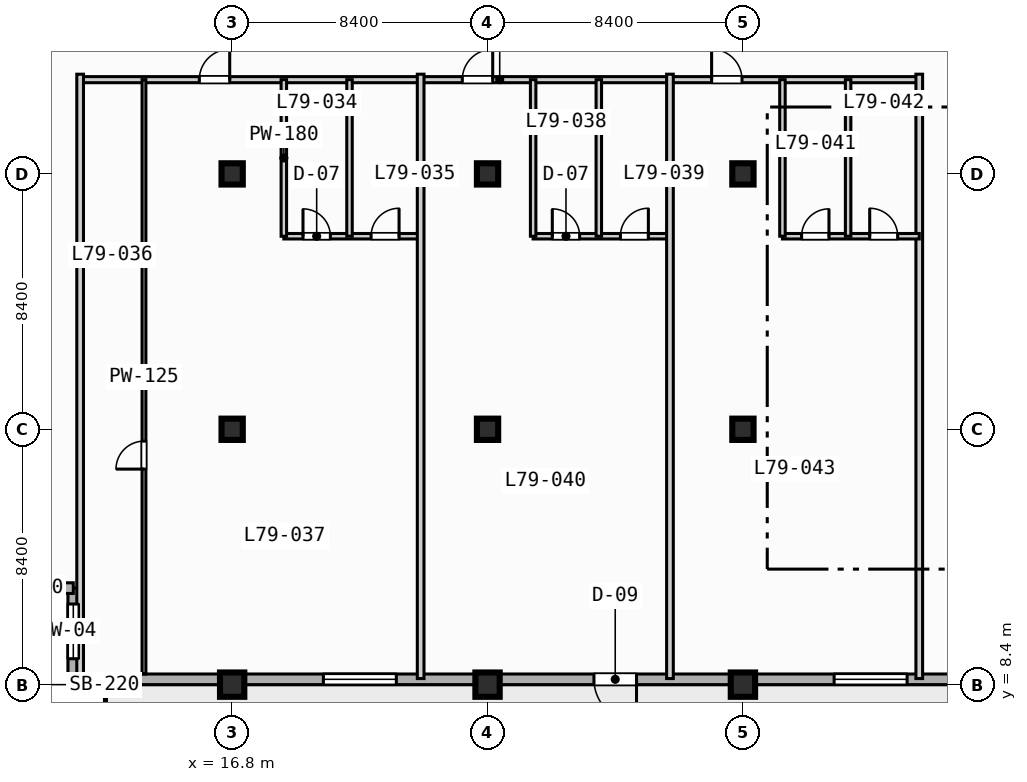
"""IFC4 building model, lengths in metres.
Left out: names, types, materials, properties, quantities, classifications, styles, units other than length and angle.
Written with IfcOpenShell. Run it as: python <this file> out.ifc"""

import sys

from ifc_helpers import new_model, si_unit, direction, frame, frame_2d, origin, origin_2d, place, context, subcontext, project, spatial, rectangle, extrude, element, fill, save


model = new_model("IFC4")
c1 = context("Model", 3, precision=1e-05, world=origin(), true_north=direction((0.0, 1.0)))
c2 = subcontext(c1, "Body", "Model", "MODEL_VIEW")
j1 = project(units=[si_unit("LENGTHUNIT", "METRE"), si_unit("PLANEANGLEUNIT", "RADIAN")], contexts=[c1])
p1 = place(None, origin())
s1 = spatial("IfcSite", under=j1, at=p1, CompositionType="ELEMENT")
p2 = place(p1, origin())
s2 = spatial("IfcBuilding", under=s1, at=p2, CompositionType="ELEMENT")
p3 = place(p2, frame((0.0, 0.0, 320.3)))
s3 = spatial("IfcBuildingStorey", under=s2, at=p3, CompositionType="ELEMENT", Elevation=320.3)
p4 = place(p3, frame((16.8, 8.4, 0.0), z_axis=(0.0, 0.0, 1.0), x_axis=(1.0, 0.0, 0.0)))
e1 = element("IfcColumn", 1, at=p4, inside=s3, PredefinedType="COLUMN", context=c2, shape_type="SweptSolid", body=[
    extrude(rectangle(XDim=0.8, YDim=0.8, at=origin_2d()), origin(), (0.0, 0.0, 1.0), 3.9),
])
for number, where, z_axis, x_axis in (
    (2, (16.8, 16.8, 0.0), (0.0, 0.0, 1.0), (1.0, 0.0, 0.0)),
    (3, (16.8, 25.2, 0.0), (0.0, 0.0, 1.0), (1.0, 0.0, 0.0)),
):
    element("IfcColumn", number, at=place(p3, frame(where, z_axis=z_axis, x_axis=x_axis)), inside=s3, PredefinedType="COLUMN", context=c2, shape_type="SweptSolid", body=[
        extrude(rectangle(XDim=0.7, YDim=0.7, at=origin_2d()), origin(), (0.0, 0.0, 1.0), 3.9),
    ])
p5 = place(p3, frame((25.2, 8.4, 0.0), z_axis=(0.0, 0.0, 1.0), x_axis=(1.0, 0.0, 0.0)))
e4 = element("IfcColumn", 4, at=p5, inside=s3, PredefinedType="COLUMN", context=c2, shape_type="SweptSolid", body=[
    extrude(rectangle(XDim=0.8, YDim=0.8, at=origin_2d()), origin(), (0.0, 0.0, 1.0), 3.9),
])
for number, where, z_axis, x_axis in (
    (5, (25.2, 16.8, 0.0), (0.0, 0.0, 1.0), (1.0, 0.0, 0.0)),
    (6, (25.2, 25.2, 0.0), (0.0, 0.0, 1.0), (1.0, 0.0, 0.0)),
):
    element("IfcColumn", number, at=place(p3, frame(where, z_axis=z_axis, x_axis=x_axis)), inside=s3, PredefinedType="COLUMN", context=c2, shape_type="SweptSolid", body=[
        extrude(rectangle(XDim=0.7, YDim=0.7, at=origin_2d()), origin(), (0.0, 0.0, 1.0), 3.9),
    ])
p6 = place(p3, frame((33.6, 8.4, 0.0), z_axis=(0.0, 0.0, 1.0), x_axis=(1.0, 0.0, 0.0)))
e7 = element("IfcColumn", 7, at=p6, inside=s3, PredefinedType="COLUMN", context=c2, shape_type="SweptSolid", body=[
    extrude(rectangle(XDim=0.8, YDim=0.8, at=origin_2d()), origin(), (0.0, 0.0, 1.0), 3.9),
])
for number, where, z_axis, x_axis in (
    (8, (33.6, 16.8, 0.0), (0.0, 0.0, 1.0), (1.0, 0.0, 0.0)),
    (9, (33.6, 25.2, 0.0), (0.0, 0.0, 1.0), (1.0, 0.0, 0.0)),
):
    element("IfcColumn", number, at=place(p3, frame(where, z_axis=z_axis, x_axis=x_axis)), inside=s3, PredefinedType="COLUMN", context=c2, shape_type="SweptSolid", body=[
        extrude(rectangle(XDim=0.7, YDim=0.7, at=origin_2d()), origin(), (0.0, 0.0, 1.0), 3.9),
    ])
p7 = place(p3, frame((11.575, 8.575, 0.0), z_axis=(0.0, 0.0, 1.0), x_axis=(0.0, 1.0, 0.0)))
e10 = element("IfcWall", 10, at=p7, inside=s3, PredefinedType="STANDARD", context=c2, shape_type="SweptSolid", body=[
    extrude(rectangle(XDim=3.0, YDim=0.35, at=frame_2d((1.5, 0.0))), origin(), (0.0, 0.0, 1.0), 3.67),
])
p8 = place(p7, frame((0.677, 0.0, 0.85)))
e11 = element("IfcOpeningElement", 11, at=p8, cuts=e10, PredefinedType="OPENING", context=c2, shape_type="SweptSolid", body=[
    extrude(rectangle(XDim=1.8, YDim=1.8, at=frame_2d((0.9, 0.9))), frame((0.0, 0.185, 0.0), z_axis=(0.0, -1.0, 0.0), x_axis=(1.0, 0.0, 0.0)), (0.0, 0.0, 1.0), 0.37),
])
p9 = place(p3, frame((11.575, 11.575, 0.0), z_axis=(0.0, 0.0, 1.0), x_axis=(-1.0, 0.0, 0.0)))
e12 = element("IfcWall", 12, at=p9, inside=s3, PredefinedType="STANDARD", context=c2, shape_type="SweptSolid", body=[
    extrude(rectangle(XDim=3.0, YDim=0.35, at=frame_2d((1.5, 0.0))), origin(), (0.0, 0.0, 1.0), 3.67),
])
p10 = place(p3, frame((64.025, 8.575, 0.0), z_axis=(0.0, 0.0, 1.0), x_axis=(-1.0, 0.0, 0.0)))
e13 = element("IfcWall", 13, at=p10, inside=s3, PredefinedType="STANDARD", context=c2, shape_type="SweptSolid", body=[
    extrude(rectangle(XDim=52.45, YDim=0.35, at=frame_2d((26.225, 0.0))), origin(), (0.0, 0.0, 1.0), 3.67),
])
p11 = place(p10, frame((33.925, 0.0, 0.0)))
e14 = element("IfcOpeningElement", 14, at=p11, cuts=e13, PredefinedType="OPENING", context=c2, shape_type="SweptSolid", body=[
    extrude(rectangle(XDim=1.4, YDim=2.2, at=frame_2d((0.7, 1.1))), frame((0.0, 0.185, 0.0), z_axis=(0.0, -1.0, 0.0), x_axis=(1.0, 0.0, 0.0)), (0.0, 0.0, 1.0), 0.37),
])
p12 = place(p10, frame((41.825, 0.0, 0.85)))
e15 = element("IfcOpeningElement", 15, at=p12, cuts=e13, PredefinedType="OPENING", context=c2, shape_type="SweptSolid", body=[
    extrude(rectangle(XDim=2.4, YDim=1.95, at=frame_2d((1.2, 0.975))), frame((0.0, 0.185, 0.0), z_axis=(0.0, -1.0, 0.0), x_axis=(1.0, 0.0, 0.0)), (0.0, 0.0, 1.0), 0.37),
])
p13 = place(p10, frame((25.025, 0.0, 0.85)))
e16 = element("IfcOpeningElement", 16, at=p13, cuts=e13, PredefinedType="OPENING", context=c2, shape_type="SweptSolid", body=[
    extrude(rectangle(XDim=2.4, YDim=1.95, at=frame_2d((1.2, 0.975))), frame((0.0, 0.185, 0.0), z_axis=(0.0, -1.0, 0.0), x_axis=(1.0, 0.0, 0.0)), (0.0, 0.0, 1.0), 0.37),
])
p14 = place(p10, frame((16.925, 0.0, 0.85)))
e17 = element("IfcOpeningElement", 17, at=p14, cuts=e13, PredefinedType="OPENING", context=c2, shape_type="SweptSolid", body=[
    extrude(rectangle(XDim=1.8, YDim=1.8, at=frame_2d((0.9, 0.9))), frame((0.0, 0.185, 0.0), z_axis=(0.0, -1.0, 0.0), x_axis=(1.0, 0.0, 0.0)), (0.0, 0.0, 1.0), 0.37),
])
p15 = place(p10, frame((50.275, 0.0, 0.85)))
e18 = element("IfcOpeningElement", 18, at=p15, cuts=e13, PredefinedType="OPENING", context=c2, shape_type="SweptSolid", body=[
    extrude(rectangle(XDim=1.8, YDim=1.8, at=frame_2d((0.9, 0.9))), frame((0.0, 0.185, 0.0), z_axis=(0.0, -1.0, 0.0), x_axis=(1.0, 0.0, 0.0)), (0.0, 0.0, 1.0), 0.37),
])
p16 = place(p3, frame((11.8, 28.3, 0.0), z_axis=(0.0, 0.0, 1.0), x_axis=(1.0, 0.0, 0.0)))
e19 = element("IfcWall", 19, at=p16, inside=s3, PredefinedType="PARTITIONING", context=c2, shape_type="SweptSolid", body=[
    extrude(rectangle(XDim=27.6, YDim=0.2, at=frame_2d((13.8, 0.0))), origin(), (0.0, 0.0, 1.0), 3.67),
])
p17 = place(p16, frame((3.92, 0.0, 0.0)))
e20 = element("IfcOpeningElement", 20, at=p17, cuts=e19, PredefinedType="OPENING", context=c2, shape_type="SweptSolid", body=[
    extrude(rectangle(XDim=1.0, YDim=2.15, at=frame_2d((0.5, 1.075))), frame((0.0, 0.11, 0.0), z_axis=(0.0, -1.0, 0.0), x_axis=(1.0, 0.0, 0.0)), (0.0, 0.0, 1.0), 0.22),
])
p18 = place(p16, frame((12.57, 0.0, 0.0)))
e21 = element("IfcOpeningElement", 21, at=p18, cuts=e19, PredefinedType="OPENING", context=c2, shape_type="SweptSolid", body=[
    extrude(rectangle(XDim=1.0, YDim=2.15, at=frame_2d((0.5, 1.075))), frame((0.0, 0.11, 0.0), z_axis=(0.0, -1.0, 0.0), x_axis=(1.0, 0.0, 0.0)), (0.0, 0.0, 1.0), 0.22),
])
p19 = place(p16, frame((20.77, 0.0, 0.0)))
e22 = element("IfcOpeningElement", 22, at=p19, cuts=e19, PredefinedType="OPENING", context=c2, shape_type="SweptSolid", body=[
    extrude(rectangle(XDim=1.0, YDim=2.15, at=frame_2d((0.5, 1.075))), frame((0.0, 0.11, 0.0), z_axis=(0.0, -1.0, 0.0), x_axis=(1.0, 0.0, 0.0)), (0.0, 0.0, 1.0), 0.22),
])
p20 = place(p3, frame((11.8, 8.6, 0.0), z_axis=(0.0, 0.0, 1.0), x_axis=(0.0, 1.0, 0.0)))
e23 = element("IfcWall", 23, at=p20, inside=s3, PredefinedType="PARTITIONING", context=c2, shape_type="SweptSolid", body=[
    extrude(rectangle(XDim=19.88, YDim=0.22, at=frame_2d((9.94, 0.0))), origin(), (0.0, 0.0, 1.0), 3.67),
])
p21 = place(p3, frame((18.5, 23.15, 0.0), z_axis=(0.0, 0.0, 1.0), x_axis=(1.0, 0.0, 0.0)))
e24 = element("IfcWall", 24, at=p21, inside=s3, PredefinedType="PLUMBINGWALL", context=c2, shape_type="SweptSolid", body=[
    extrude(rectangle(XDim=4.5, YDim=0.18, at=frame_2d((2.25, 0.0))), origin(), (0.0, 0.0, 1.0), 3.67),
])
p22 = place(p21, frame((0.63, 0.0, 0.0)))
e25 = element("IfcOpeningElement", 25, at=p22, cuts=e24, PredefinedType="OPENING", context=c2, shape_type="SweptSolid", body=[
    extrude(rectangle(XDim=0.9, YDim=2.1, at=frame_2d((0.45, 1.05))), frame((0.0, 0.1, 0.0), z_axis=(0.0, -1.0, 0.0), x_axis=(1.0, 0.0, 0.0)), (0.0, 0.0, 1.0), 0.2),
])
p23 = place(p21, frame((2.87, 0.0, 0.0)))
e26 = element("IfcOpeningElement", 26, at=p23, cuts=e24, PredefinedType="OPENING", context=c2, shape_type="SweptSolid", body=[
    extrude(rectangle(XDim=0.92, YDim=2.1, at=frame_2d((0.46, 1.05))), frame((0.0, 0.1, 0.0), z_axis=(0.0, -1.0, 0.0), x_axis=(1.0, 0.0, 0.0)), (0.0, 0.0, 1.0), 0.2),
])
for number, where, z_axis, x_axis in (
    (27, (18.5, 23.15, 0.0), (0.0, 0.0, 1.0), (0.0, 1.0, 0.0)),
    (28, (20.66, 23.15, 0.0), (0.0, 0.0, 1.0), (0.0, 1.0, 0.0)),
):
    element("IfcWall", number, at=place(p3, frame(where, z_axis=z_axis, x_axis=x_axis)), inside=s3, PredefinedType="PLUMBINGWALL", context=c2, shape_type="SweptSolid", body=[
        extrude(rectangle(XDim=5.15, YDim=0.18, at=frame_2d((2.575, 0.0))), origin(), (0.0, 0.0, 1.0), 3.67),
    ])
p24 = place(p3, frame((13.9, 8.75, 0.0), z_axis=(0.0, 0.0, 1.0), x_axis=(0.0, 1.0, 0.0)))
e29 = element("IfcWall", 29, at=p24, inside=s3, PredefinedType="PARTITIONING", context=c2, shape_type="SweptSolid", body=[
    extrude(rectangle(XDim=19.55, YDim=0.125, at=frame_2d((9.775, 0.0))), origin(), (0.0, 0.0, 1.0), 3.67),
])
p25 = place(p24, frame((6.74, 0.0, 0.0)))
e30 = element("IfcOpeningElement", 30, at=p25, cuts=e29, PredefinedType="OPENING", context=c2, shape_type="SweptSolid", body=[
    extrude(rectangle(XDim=0.92, YDim=2.1, at=frame_2d((0.46, 1.05))), frame((0.0, 0.073, 0.0), z_axis=(0.0, -1.0, 0.0), x_axis=(1.0, 0.0, 0.0)), (0.0, 0.0, 1.0), 0.145),
])
p26 = place(p3, frame((23.0, 8.6, 0.0), z_axis=(0.0, 0.0, 1.0), x_axis=(0.0, 1.0, 0.0)))
e31 = element("IfcWall", 31, at=p26, inside=s3, PredefinedType="PARTITIONING", context=c2, shape_type="SweptSolid", body=[
    extrude(rectangle(XDim=19.88, YDim=0.22, at=frame_2d((9.94, 0.0))), origin(), (0.0, 0.0, 1.0), 3.67),
])
p27 = place(p3, frame((26.7, 23.15, 0.0), z_axis=(0.0, 0.0, 1.0), x_axis=(1.0, 0.0, 0.0)))
e32 = element("IfcWall", 32, at=p27, inside=s3, PredefinedType="PLUMBINGWALL", context=c2, shape_type="SweptSolid", body=[
    extrude(rectangle(XDim=4.5, YDim=0.18, at=frame_2d((2.25, 0.0))), origin(), (0.0, 0.0, 1.0), 3.67),
])
p28 = place(p27, frame((0.63, 0.0, 0.0)))
e33 = element("IfcOpeningElement", 33, at=p28, cuts=e32, PredefinedType="OPENING", context=c2, shape_type="SweptSolid", body=[
    extrude(rectangle(XDim=0.9, YDim=2.1, at=frame_2d((0.45, 1.05))), frame((0.0, 0.1, 0.0), z_axis=(0.0, -1.0, 0.0), x_axis=(1.0, 0.0, 0.0)), (0.0, 0.0, 1.0), 0.2),
])
p29 = place(p27, frame((2.87, 0.0, 0.0)))
e34 = element("IfcOpeningElement", 34, at=p29, cuts=e32, PredefinedType="OPENING", context=c2, shape_type="SweptSolid", body=[
    extrude(rectangle(XDim=0.92, YDim=2.1, at=frame_2d((0.46, 1.05))), frame((0.0, 0.1, 0.0), z_axis=(0.0, -1.0, 0.0), x_axis=(1.0, 0.0, 0.0)), (0.0, 0.0, 1.0), 0.2),
])
for number, where, z_axis, x_axis in (
    (35, (26.7, 23.15, 0.0), (0.0, 0.0, 1.0), (0.0, 1.0, 0.0)),
    (36, (28.86, 23.15, 0.0), (0.0, 0.0, 1.0), (0.0, 1.0, 0.0)),
):
    element("IfcWall", number, at=place(p3, frame(where, z_axis=z_axis, x_axis=x_axis)), inside=s3, PredefinedType="PLUMBINGWALL", context=c2, shape_type="SweptSolid", body=[
        extrude(rectangle(XDim=5.15, YDim=0.18, at=frame_2d((2.575, 0.0))), origin(), (0.0, 0.0, 1.0), 3.67),
    ])
for number, where, z_axis, x_axis in (
    (37, (31.2, 8.6, 0.0), (0.0, 0.0, 1.0), (0.0, 1.0, 0.0)),
    (38, (39.4, 8.6, 0.0), (0.0, 0.0, 1.0), (0.0, 1.0, 0.0)),
):
    element("IfcWall", number, at=place(p3, frame(where, z_axis=z_axis, x_axis=x_axis)), inside=s3, PredefinedType="PARTITIONING", context=c2, shape_type="SweptSolid", body=[
        extrude(rectangle(XDim=19.88, YDim=0.22, at=frame_2d((9.94, 0.0))), origin(), (0.0, 0.0, 1.0), 3.67),
    ])
p30 = place(p3, frame((34.9, 23.15, 0.0), z_axis=(0.0, 0.0, 1.0), x_axis=(1.0, 0.0, 0.0)))
e39 = element("IfcWall", 39, at=p30, inside=s3, PredefinedType="PLUMBINGWALL", context=c2, shape_type="SweptSolid", body=[
    extrude(rectangle(XDim=4.5, YDim=0.18, at=frame_2d((2.25, 0.0))), origin(), (0.0, 0.0, 1.0), 3.67),
])
p31 = place(p30, frame((0.63, 0.0, 0.0)))
e40 = element("IfcOpeningElement", 40, at=p31, cuts=e39, PredefinedType="OPENING", context=c2, shape_type="SweptSolid", body=[
    extrude(rectangle(XDim=0.9, YDim=2.1, at=frame_2d((0.45, 1.05))), frame((0.0, 0.1, 0.0), z_axis=(0.0, -1.0, 0.0), x_axis=(1.0, 0.0, 0.0)), (0.0, 0.0, 1.0), 0.2),
])
p32 = place(p30, frame((2.87, 0.0, 0.0)))
e41 = element("IfcOpeningElement", 41, at=p32, cuts=e39, PredefinedType="OPENING", context=c2, shape_type="SweptSolid", body=[
    extrude(rectangle(XDim=0.92, YDim=2.1, at=frame_2d((0.46, 1.05))), frame((0.0, 0.1, 0.0), z_axis=(0.0, -1.0, 0.0), x_axis=(1.0, 0.0, 0.0)), (0.0, 0.0, 1.0), 0.2),
])
for number, where, z_axis, x_axis in (
    (42, (34.9, 23.15, 0.0), (0.0, 0.0, 1.0), (0.0, 1.0, 0.0)),
    (43, (37.06, 23.15, 0.0), (0.0, 0.0, 1.0), (0.0, 1.0, 0.0)),
):
    element("IfcWall", number, at=place(p3, frame(where, z_axis=z_axis, x_axis=x_axis)), inside=s3, PredefinedType="PLUMBINGWALL", context=c2, shape_type="SweptSolid", body=[
        extrude(rectangle(XDim=5.15, YDim=0.18, at=frame_2d((2.575, 0.0))), origin(), (0.0, 0.0, 1.0), 3.67),
    ])
p33 = place(p8, origin())
e44 = element("IfcWindow", 44, at=p33, inside=s3, PartitioningType="SINGLE_PANEL", PredefinedType="WINDOW", context=c2, shape_type="SweptSolid", body=[
    extrude(rectangle(XDim=1.8, YDim=1.8, at=frame_2d((0.9, 0.9))), frame((0.0, 0.03, 0.0), z_axis=(0.0, -1.0, 0.0), x_axis=(1.0, 0.0, 0.0)), (0.0, 0.0, 1.0), 0.06),
])
fill(e11, e44)
p34 = place(p11, origin())
e45 = element("IfcDoor", 45, at=p34, inside=s3, OperationType="SINGLE_SWING_LEFT", PredefinedType="DOOR", context=c2, shape_type="SweptSolid", body=[
    extrude(rectangle(XDim=1.4, YDim=2.2, at=frame_2d((0.7, 1.1))), frame((0.0, 0.025, 0.0), z_axis=(0.0, -1.0, 0.0), x_axis=(1.0, 0.0, 0.0)), (0.0, 0.0, 1.0), 0.05),
])
fill(e14, e45)
p35 = place(p12, origin())
e46 = element("IfcWindow", 46, at=p35, inside=s3, PartitioningType="SINGLE_PANEL", PredefinedType="WINDOW", context=c2, shape_type="SweptSolid", body=[
    extrude(rectangle(XDim=2.4, YDim=1.95, at=frame_2d((1.2, 0.975))), frame((0.0, 0.03, 0.0), z_axis=(0.0, -1.0, 0.0), x_axis=(1.0, 0.0, 0.0)), (0.0, 0.0, 1.0), 0.06),
])
fill(e15, e46)
p36 = place(p13, origin())
e47 = element("IfcWindow", 47, at=p36, inside=s3, PartitioningType="SINGLE_PANEL", PredefinedType="WINDOW", context=c2, shape_type="SweptSolid", body=[
    extrude(rectangle(XDim=2.4, YDim=1.95, at=frame_2d((1.2, 0.975))), frame((0.0, 0.03, 0.0), z_axis=(0.0, -1.0, 0.0), x_axis=(1.0, 0.0, 0.0)), (0.0, 0.0, 1.0), 0.06),
])
fill(e16, e47)
p37 = place(p15, origin())
e48 = element("IfcWindow", 48, at=p37, inside=s3, PartitioningType="SINGLE_PANEL", PredefinedType="WINDOW", context=c2, shape_type="SweptSolid", body=[
    extrude(rectangle(XDim=1.8, YDim=1.8, at=frame_2d((0.9, 0.9))), frame((0.0, 0.03, 0.0), z_axis=(0.0, -1.0, 0.0), x_axis=(1.0, 0.0, 0.0)), (0.0, 0.0, 1.0), 0.06),
])
fill(e18, e48)
p38 = place(p17, origin())
e49 = element("IfcDoor", 49, at=p38, inside=s3, OperationType="SINGLE_SWING_RIGHT", PredefinedType="DOOR", context=c2, shape_type="SweptSolid", body=[
    extrude(rectangle(XDim=1.0, YDim=2.15, at=frame_2d((0.5, 1.075))), frame((0.0, 0.025, 0.0), z_axis=(0.0, -1.0, 0.0), x_axis=(1.0, 0.0, 0.0)), (0.0, 0.0, 1.0), 0.05),
])
fill(e20, e49)
p39 = place(p18, origin())
e50 = element("IfcDoor", 50, at=p39, inside=s3, OperationType="SINGLE_SWING_RIGHT", PredefinedType="DOOR", context=c2, shape_type="SweptSolid", body=[
    extrude(rectangle(XDim=1.0, YDim=2.15, at=frame_2d((0.5, 1.075))), frame((0.0, 0.025, 0.0), z_axis=(0.0, -1.0, 0.0), x_axis=(1.0, 0.0, 0.0)), (0.0, 0.0, 1.0), 0.05),
])
fill(e21, e50)
p40 = place(p19, origin())
e51 = element("IfcDoor", 51, at=p40, inside=s3, OperationType="SINGLE_SWING_LEFT", PredefinedType="DOOR", context=c2, shape_type="SweptSolid", body=[
    extrude(rectangle(XDim=1.0, YDim=2.15, at=frame_2d((0.5, 1.075))), frame((0.0, 0.025, 0.0), z_axis=(0.0, -1.0, 0.0), x_axis=(1.0, 0.0, 0.0)), (0.0, 0.0, 1.0), 0.05),
])
fill(e22, e51)
p41 = place(p22, origin())
e52 = element("IfcDoor", 52, at=p41, inside=s3, OperationType="SINGLE_SWING_LEFT", PredefinedType="DOOR", context=c2, shape_type="SweptSolid", body=[
    extrude(rectangle(XDim=0.9, YDim=2.1, at=frame_2d((0.45, 1.05))), frame((0.0, 0.025, 0.0), z_axis=(0.0, -1.0, 0.0), x_axis=(1.0, 0.0, 0.0)), (0.0, 0.0, 1.0), 0.05),
])
fill(e25, e52)
p42 = place(p23, origin())
e53 = element("IfcDoor", 53, at=p42, inside=s3, OperationType="SINGLE_SWING_RIGHT", PredefinedType="DOOR", context=c2, shape_type="SweptSolid", body=[
    extrude(rectangle(XDim=0.92, YDim=2.1, at=frame_2d((0.46, 1.05))), frame((0.0, 0.025, 0.0), z_axis=(0.0, -1.0, 0.0), x_axis=(1.0, 0.0, 0.0)), (0.0, 0.0, 1.0), 0.05),
])
fill(e26, e53)
p43 = place(p25, origin())
e54 = element("IfcDoor", 54, at=p43, inside=s3, OperationType="SINGLE_SWING_LEFT", PredefinedType="DOOR", context=c2, shape_type="SweptSolid", body=[
    extrude(rectangle(XDim=0.92, YDim=2.1, at=frame_2d((0.46, 1.05))), frame((0.0, 0.025, 0.0), z_axis=(0.0, -1.0, 0.0), x_axis=(1.0, 0.0, 0.0)), (0.0, 0.0, 1.0), 0.05),
])
fill(e30, e54)
p44 = place(p28, origin())
e55 = element("IfcDoor", 55, at=p44, inside=s3, OperationType="SINGLE_SWING_LEFT", PredefinedType="DOOR", context=c2, shape_type="SweptSolid", body=[
    extrude(rectangle(XDim=0.9, YDim=2.1, at=frame_2d((0.45, 1.05))), frame((0.0, 0.025, 0.0), z_axis=(0.0, -1.0, 0.0), x_axis=(1.0, 0.0, 0.0)), (0.0, 0.0, 1.0), 0.05),
])
fill(e33, e55)
p45 = place(p29, origin())
e56 = element("IfcDoor", 56, at=p45, inside=s3, OperationType="SINGLE_SWING_RIGHT", PredefinedType="DOOR", context=c2, shape_type="SweptSolid", body=[
    extrude(rectangle(XDim=0.92, YDim=2.1, at=frame_2d((0.46, 1.05))), frame((0.0, 0.025, 0.0), z_axis=(0.0, -1.0, 0.0), x_axis=(1.0, 0.0, 0.0)), (0.0, 0.0, 1.0), 0.05),
])
fill(e34, e56)
p46 = place(p31, origin())
e57 = element("IfcDoor", 57, at=p46, inside=s3, OperationType="SINGLE_SWING_RIGHT", PredefinedType="DOOR", context=c2, shape_type="SweptSolid", body=[
    extrude(rectangle(XDim=0.9, YDim=2.1, at=frame_2d((0.45, 1.05))), frame((0.0, 0.025, 0.0), z_axis=(0.0, -1.0, 0.0), x_axis=(1.0, 0.0, 0.0)), (0.0, 0.0, 1.0), 0.05),
])
fill(e40, e57)
p47 = place(p32, origin())
e58 = element("IfcDoor", 58, at=p47, inside=s3, OperationType="SINGLE_SWING_LEFT", PredefinedType="DOOR", context=c2, shape_type="SweptSolid", body=[
    extrude(rectangle(XDim=0.92, YDim=2.1, at=frame_2d((0.46, 1.05))), frame((0.0, 0.025, 0.0), z_axis=(0.0, -1.0, 0.0), x_axis=(1.0, 0.0, 0.0)), (0.0, 0.0, 1.0), 0.05),
])
fill(e41, e58)
save(model, sys.argv[1])
